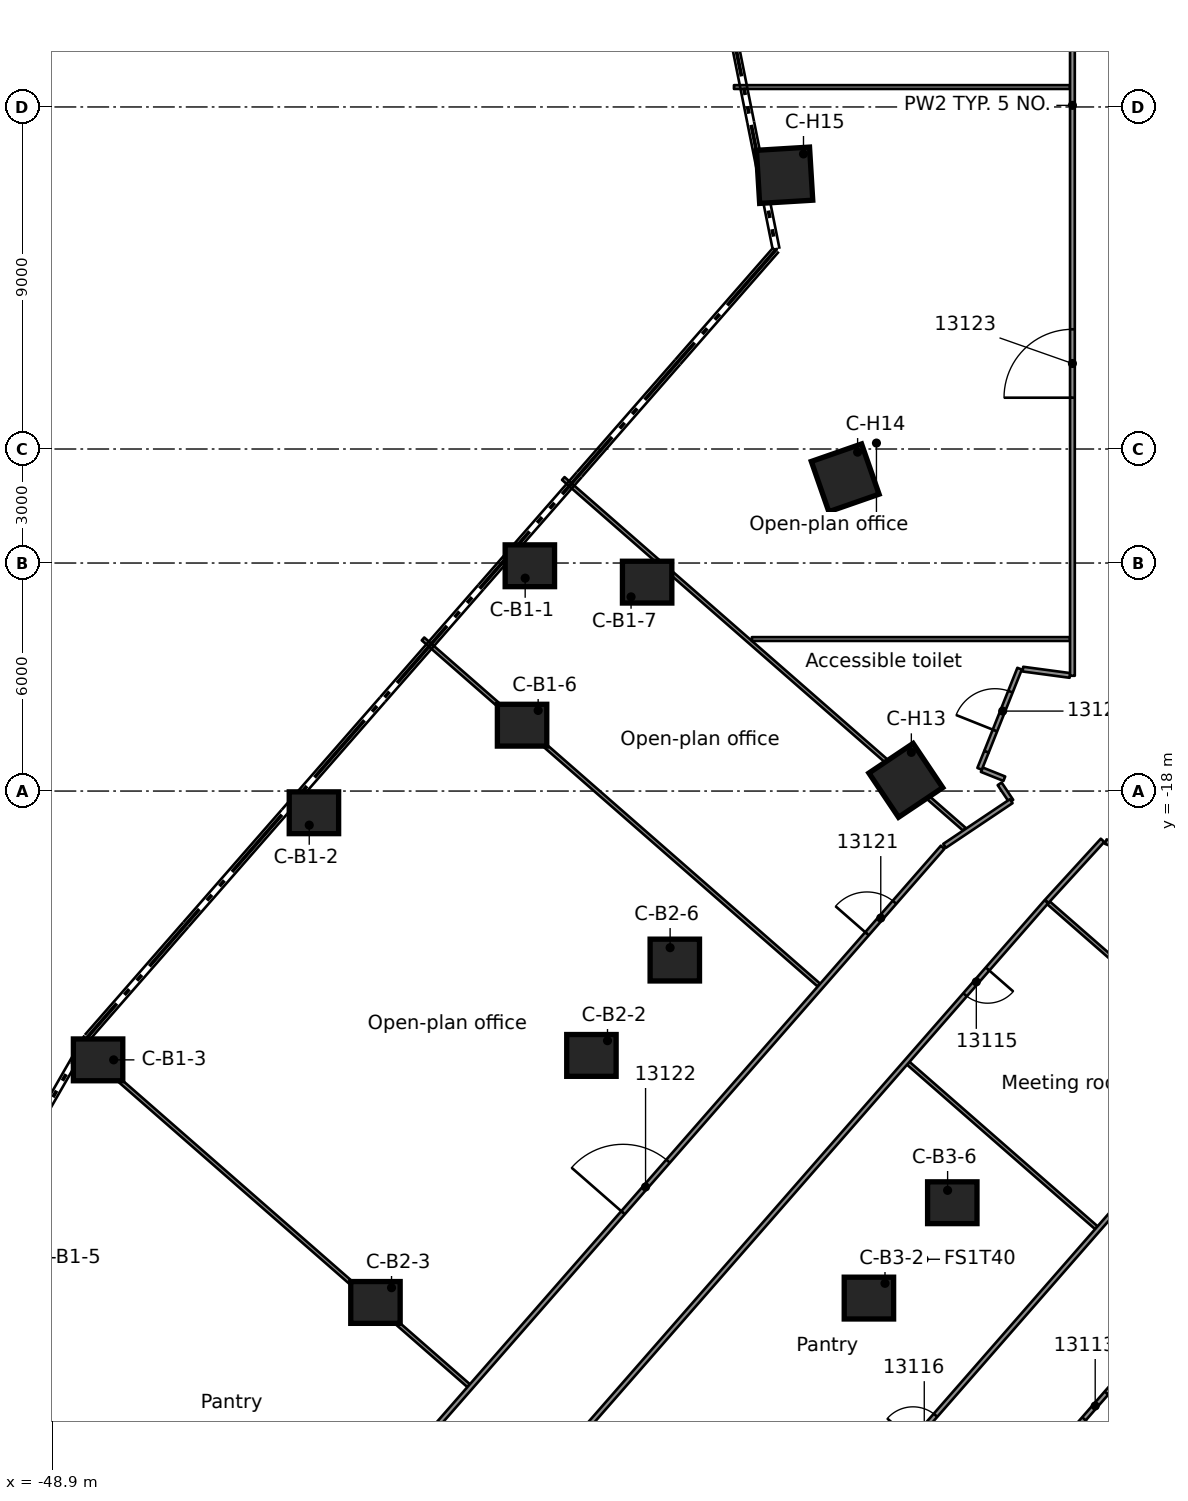
"""IFC4 building model, lengths in metres.
Left out: names, types, materials, properties, quantities, classifications, styles, units other than length and angle.
Written with IfcOpenShell. Run it as: python <this file> out.ifc"""

import sys

from ifc_helpers import new_model, si_unit, direction, frame, frame_2d, origin, origin_2d, place, context, subcontext, project, spatial, rectangle, extrude, element, fill, save


model = new_model("IFC4")
c1 = context("Model", 3, precision=1e-05, world=origin(), true_north=direction((0.0, 1.0)))
c2 = subcontext(c1, "Body", "Model", "MODEL_VIEW")
j1 = project(units=[si_unit("LENGTHUNIT", "METRE"), si_unit("PLANEANGLEUNIT", "RADIAN")], contexts=[c1])
p1 = place(None, origin())
s1 = spatial("IfcSite", under=j1, at=p1, CompositionType="ELEMENT")
p2 = place(p1, origin())
s2 = spatial("IfcBuilding", under=s1, at=p2, CompositionType="ELEMENT")
p3 = place(p2, frame((0.0, 0.0, 62.3)))
s3 = spatial("IfcBuildingStorey", under=s2, at=p3, CompositionType="ELEMENT", Elevation=62.3)
for number, where, z_axis, x_axis in (
    (1, (-36.327, -12.072, 0.0), (0.0, 0.0, 1.0), (1.0, 0.0, 0.0)),
    (2, (-42.009, -18.571, 0.0), (0.0, 0.0, 1.0), (1.0, 0.0, 0.0)),
    (3, (-47.689, -25.073, 0.0), (0.0, 0.0, 1.0), (1.0, 0.0, 0.0)),
    (4, (-36.532, -16.267, 0.0), (0.0, 0.0, 1.0), (1.0, 0.0, 0.0)),
    (5, (-33.241, -12.503, 0.0), (0.0, 0.0, 1.0), (1.0, 0.0, 0.0)),
    (6, (-34.707, -24.956, 0.0), (0.0, 0.0, 1.0), (1.0, 0.0, 0.0)),
    (7, (-40.39, -31.456, 0.0), (0.0, 0.0, 1.0), (1.0, 0.0, 0.0)),
    (8, (-32.513, -22.447, 0.0), (0.0, 0.0, 1.0), (1.0, 0.0, 0.0)),
    (9, (-27.405, -31.341, 0.0), (0.0, 0.0, 1.0), (1.0, 0.0, 0.0)),
    (10, (-25.211, -28.832, 0.0), (0.0, 0.0, 1.0), (1.0, 0.0, 0.0)),
):
    element("IfcColumn", number, at=place(p3, frame(where, z_axis=z_axis, x_axis=x_axis)), inside=s3, PredefinedType="COLUMN", context=c2, shape_type="SweptSolid", body=[
        extrude(rectangle(XDim=1.3, YDim=1.1, at=origin_2d()), origin(), (0.0, 0.0, 1.0), 3.5),
    ])
for number, where, z_axis, x_axis in (
    (11, (-26.434, -17.718, 0.0), (0.0, 0.0, 1.0), (-0.831, -0.557, 0.0)),
    (12, (-28.029, -9.758, 0.0), (0.0, 0.0, 1.0), (-0.944, -0.329, 0.0)),
    (13, (-29.624, -1.797, 0.0), (0.0, 0.0, 1.0), (-0.998, -0.061, 0.0)),
):
    element("IfcColumn", number, at=place(p3, frame(where, z_axis=z_axis, x_axis=x_axis)), inside=s3, PredefinedType="COLUMN", context=c2, shape_type="SweptSolid", body=[
        extrude(rectangle(XDim=1.4, YDim=1.4, at=origin_2d()), origin(), (0.0, 0.0, 1.0), 3.5),
    ])
p4 = place(p3, frame((-23.965, -17.81, 0.0), z_axis=(0.0, 0.0, 1.0), x_axis=(0.55613676815, -0.831090786323, 0.0)))
e14 = element("IfcWall", 14, at=p4, inside=s3, PredefinedType="PARTITIONING", context=c2, shape_type="SweptSolid", body=[
    extrude(rectangle(XDim=0.549, YDim=0.125, at=frame_2d((0.274, 0.0))), origin(), (0.0, 0.0, 1.0), 3.08),
])
p5 = place(p3, frame((-48.313, -24.572, 0.0), z_axis=(0.0, 0.0, 1.0), x_axis=(0.75276101301, -0.658293898872, 0.0)))
e15 = element("IfcWall", 15, at=p5, inside=s3, PredefinedType="PARTITIONING", context=c2, shape_type="SweptSolid", body=[
    extrude(rectangle(XDim=13.783, YDim=0.1, at=frame_2d((6.891, 0.0))), origin(), (0.0, 0.0, 1.0), 3.08),
])
p6 = place(p3, frame((-39.139, -13.997, 0.0), z_axis=(0.0, 0.0, 1.0), x_axis=(0.752825840036, -0.65821976161, 0.0)))
e16 = element("IfcWall", 16, at=p6, inside=s3, PredefinedType="PARTITIONING", context=c2, shape_type="SweptSolid", body=[
    extrude(rectangle(XDim=13.837, YDim=0.1, at=frame_2d((6.918, 0.0))), origin(), (0.0, 0.0, 1.0), 3.08),
])
p7 = place(p3, frame((-26.369, -25.163, 0.0), z_axis=(0.0, 0.0, 1.0), x_axis=(0.752836606275, -0.658207447734, 0.0)))
e17 = element("IfcWall", 17, at=p7, inside=s3, PredefinedType="PARTITIONING", context=c2, shape_type="SweptSolid", body=[
    extrude(rectangle(XDim=6.574, YDim=0.1, at=frame_2d((3.287, 0.0))), origin(), (0.0, 0.0, 1.0), 3.08),
])
p8 = place(p3, frame((-35.448, -9.776, 0.0), z_axis=(0.0, 0.0, 1.0), x_axis=(0.752812898316, -0.658234563153, 0.0)))
e18 = element("IfcWall", 18, at=p8, inside=s3, PredefinedType="PARTITIONING", context=c2, shape_type="SweptSolid", body=[
    extrude(rectangle(XDim=14.019, YDim=0.1, at=frame_2d((7.01, 0.0))), origin(), (0.0, 0.0, 1.0), 3.08),
])
p9 = place(p3, frame((-22.678, -20.942, 0.0), z_axis=(0.0, 0.0, 1.0), x_axis=(0.752838405923, -0.658205389349, 0.0)))
e19 = element("IfcWall", 19, at=p9, inside=s3, PredefinedType="PARTITIONING", context=c2, shape_type="SweptSolid", body=[
    extrude(rectangle(XDim=6.297, YDim=0.1, at=frame_2d((3.149, 0.0))), origin(), (0.0, 0.0, 1.0), 3.08),
])
p10 = place(p3, frame((-24.435, -17.438, 0.0), z_axis=(0.0, 0.0, 1.0), x_axis=(0.928555762044, -0.3711929374, 0.0)))
e20 = element("IfcWall", 20, at=p10, inside=s3, PredefinedType="PARTITIONING", context=c2, shape_type="SweptSolid", body=[
    extrude(rectangle(XDim=0.639, YDim=0.125, at=frame_2d((0.319, 0.0))), origin(), (0.0, 0.0, 1.0), 3.08),
])
p11 = place(p3, frame((-21.173, -19.329, 0.0), z_axis=(0.0, 0.0, 1.0), x_axis=(0.928691976307, -0.37085200976, 0.0)))
e21 = element("IfcWall", 21, at=p11, inside=s3, PredefinedType="PARTITIONING", context=c2, shape_type="SweptSolid", body=[
    extrude(rectangle(XDim=0.547, YDim=0.125, at=frame_2d((0.273, 0.0))), origin(), (0.0, 0.0, 1.0), 3.08),
])
p12 = place(p3, frame((-23.353, -14.792, 0.0), z_axis=(0.0, 0.0, 1.0), x_axis=(0.991114791297, -0.133009287168, 0.0)))
e22 = element("IfcWall", 22, at=p12, inside=s3, PredefinedType="PARTITIONING", context=c2, shape_type="SweptSolid", body=[
    extrude(rectangle(XDim=1.248, YDim=0.125, at=frame_2d((0.624, 0.0))), origin(), (0.0, 0.0, 1.0), 3.08),
])
p13 = place(p3, frame((-30.485, -14.0, 0.0), z_axis=(0.0, 0.0, 1.0), x_axis=(1.0, 0.0, 0.0)))
e23 = element("IfcWall", 23, at=p13, inside=s3, PredefinedType="PARTITIONING", context=c2, shape_type="SweptSolid", body=[
    extrude(rectangle(XDim=8.372, YDim=0.1, at=frame_2d((4.186, 0.0))), origin(), (0.0, 0.0, 1.0), 3.08),
])
p14 = place(p3, frame((-30.956, 0.524, 0.0), z_axis=(0.0, 0.0, 1.0), x_axis=(1.0, 0.0, 0.0)))
e24 = element("IfcWall", 24, at=p14, inside=s3, PredefinedType="PARTITIONING", context=c2, shape_type="SweptSolid", body=[
    extrude(rectangle(XDim=8.843, YDim=0.1, at=frame_2d((4.421, 0.0))), origin(), (0.0, 0.0, 1.0), 3.08),
])
p15 = place(p3, frame((-23.66, -18.266, 0.0), z_axis=(0.0, 0.0, 1.0), x_axis=(-0.83066036782, -0.556779447658, 0.0)))
e25 = element("IfcWall", 25, at=p15, inside=s3, PredefinedType="PARTITIONING", context=c2, shape_type="SweptSolid", body=[
    extrude(rectangle(XDim=2.112, YDim=0.125, at=frame_2d((1.056, 0.0))), origin(), (0.0, 0.0, 1.0), 3.08),
])
p16 = place(p3, frame((-22.725, -20.901, 0.0), z_axis=(0.0, 0.0, 1.0), x_axis=(0.674921155875, 0.737889851775, 0.0)))
e26 = element("IfcWall", 26, at=p16, inside=s3, PredefinedType="PARTITIONING", context=c2, shape_type="SweptSolid", body=[
    extrude(rectangle(XDim=2.175, YDim=0.125, at=frame_2d((1.087, 0.0))), origin(), (0.0, 0.0, 1.0), 3.08),
])
p17 = place(p3, frame((-15.464, -27.332, 0.0), z_axis=(0.0, 0.0, 1.0), x_axis=(-0.658219577617, -0.752826000907, 0.0)))
e27 = element("IfcWall", 27, at=p17, inside=s3, PredefinedType="PARTITIONING", context=c2, shape_type="SweptSolid", body=[
    extrude(rectangle(XDim=24.745, YDim=0.125, at=frame_2d((12.373, 0.0))), origin(), (0.0, 0.0, 1.0), 3.08),
])
p18 = place(p17, frame((2.288, 0.0, 0.0)))
e28 = element("IfcOpeningElement", 28, at=p18, cuts=e27, PredefinedType="OPENING", context=c2, shape_type="SweptSolid", body=[
    extrude(rectangle(XDim=0.9, YDim=2.1, at=frame_2d((0.45, 1.05))), frame((0.0, 0.073, 0.0), z_axis=(0.0, -1.0, 0.0), x_axis=(1.0, 0.0, 0.0)), (0.0, 0.0, 1.0), 0.145),
])
p19 = place(p17, frame((8.645, 0.0, 0.0)))
e29 = element("IfcOpeningElement", 29, at=p19, cuts=e27, PredefinedType="OPENING", context=c2, shape_type="SweptSolid", body=[
    extrude(rectangle(XDim=0.9, YDim=2.1, at=frame_2d((0.45, 1.05))), frame((0.0, 0.073, 0.0), z_axis=(0.0, -1.0, 0.0), x_axis=(1.0, 0.0, 0.0)), (0.0, 0.0, 1.0), 0.145),
])
p20 = place(p17, frame((15.646, 0.0, 0.0)))
e30 = element("IfcOpeningElement", 30, at=p20, cuts=e27, PredefinedType="OPENING", context=c2, shape_type="SweptSolid", body=[
    extrude(rectangle(XDim=0.9, YDim=2.1, at=frame_2d((0.45, 1.05))), frame((0.0, 0.073, 0.0), z_axis=(0.0, -1.0, 0.0), x_axis=(1.0, 0.0, 0.0)), (0.0, 0.0, 1.0), 0.145),
])
p21 = place(p17, frame((21.645, 0.0, 0.0)))
e31 = element("IfcOpeningElement", 31, at=p21, cuts=e27, PredefinedType="OPENING", context=c2, shape_type="SweptSolid", body=[
    extrude(rectangle(XDim=0.9, YDim=2.1, at=frame_2d((0.45, 1.05))), frame((0.0, 0.073, 0.0), z_axis=(0.0, -1.0, 0.0), x_axis=(1.0, 0.0, 0.0)), (0.0, 0.0, 1.0), 0.145),
])
p22 = place(p3, frame((-32.036, -41.726, 0.0), z_axis=(0.0, 0.0, 1.0), x_axis=(0.658205705433, 0.75283812957, 0.0)))
e32 = element("IfcWall", 32, at=p22, inside=s3, PredefinedType="PARTITIONING", context=c2, shape_type="SweptSolid", body=[
    extrude(rectangle(XDim=21.168, YDim=0.125, at=frame_2d((10.584, 0.0))), origin(), (0.0, 0.0, 1.0), 3.08),
])
p23 = place(p22, frame((8.798, 0.0, 0.0)))
e33 = element("IfcOpeningElement", 33, at=p23, cuts=e32, PredefinedType="OPENING", context=c2, shape_type="SweptSolid", body=[
    extrude(rectangle(XDim=0.9, YDim=2.1, at=frame_2d((0.45, 1.05))), frame((0.0, 0.073, 0.0), z_axis=(0.0, -1.0, 0.0), x_axis=(1.0, 0.0, 0.0)), (0.0, 0.0, 1.0), 0.145),
])
p24 = place(p3, frame((-22.736, -20.913, 0.0), z_axis=(0.0, 0.0, 1.0), x_axis=(-0.658236458127, -0.752811241409, 0.0)))
e34 = element("IfcWall", 34, at=p24, inside=s3, PredefinedType="PARTITIONING", context=c2, shape_type="SweptSolid", body=[
    extrude(rectangle(XDim=21.79, YDim=0.125, at=frame_2d((10.895, 0.0))), origin(), (0.0, 0.0, 1.0), 3.08),
])
p25 = place(p24, frame((2.35, 0.0, 0.0)))
e35 = element("IfcOpeningElement", 35, at=p25, cuts=e34, PredefinedType="OPENING", context=c2, shape_type="SweptSolid", body=[
    extrude(rectangle(XDim=0.9, YDim=2.1, at=frame_2d((0.45, 1.05))), frame((0.0, 0.073, 0.0), z_axis=(0.0, -1.0, 0.0), x_axis=(1.0, 0.0, 0.0)), (0.0, 0.0, 1.0), 0.145),
])
p26 = place(p3, frame((-41.314, -37.6, 0.0), z_axis=(0.0, 0.0, 1.0), x_axis=(0.658340906106, 0.752719902319, 0.0)))
e36 = element("IfcWall", 36, at=p26, inside=s3, PredefinedType="PARTITIONING", context=c2, shape_type="SweptSolid", body=[
    extrude(rectangle(XDim=24.075, YDim=0.125, at=frame_2d((12.038, 0.0))), origin(), (0.0, 0.0, 1.0), 3.08),
])
p27 = place(p26, frame((21.051, 0.0, 0.0)))
e37 = element("IfcOpeningElement", 37, at=p27, cuts=e36, PredefinedType="OPENING", context=c2, shape_type="SweptSolid", body=[
    extrude(rectangle(XDim=1.1, YDim=2.1, at=frame_2d((0.55, 1.05))), frame((0.0, 0.073, 0.0), z_axis=(0.0, -1.0, 0.0), x_axis=(1.0, 0.0, 0.0)), (0.0, 0.0, 1.0), 0.145),
])
p28 = place(p26, frame((11.3, 0.0, 0.0)))
e38 = element("IfcOpeningElement", 38, at=p28, cuts=e36, PredefinedType="OPENING", context=c2, shape_type="SweptSolid", body=[
    extrude(rectangle(XDim=1.8, YDim=2.1, at=frame_2d((0.9, 1.05))), frame((0.0, 0.073, 0.0), z_axis=(0.0, -1.0, 0.0), x_axis=(1.0, 0.0, 0.0)), (0.0, 0.0, 1.0), 0.145),
])
p29 = place(p3, frame((-24.493, -17.415, 0.0), z_axis=(0.0, 0.0, 1.0), x_axis=(0.374072822582, 0.9273993333, 0.0)))
e39 = element("IfcWall", 39, at=p29, inside=s3, PredefinedType="PARTITIONING", context=c2, shape_type="SweptSolid", body=[
    extrude(rectangle(XDim=0.486, YDim=0.125, at=frame_2d((0.243, 0.0))), origin(), (0.0, 0.0, 1.0), 3.08),
])
p30 = place(p3, frame((-24.311, -16.964, 0.0), z_axis=(0.0, 0.0, 1.0), x_axis=(0.370459614681, 0.928848574252, 0.0)))
e40 = element("IfcWall", 40, at=p30, inside=s3, PredefinedType="PARTITIONING", context=c2, shape_type="SweptSolid", body=[
    extrude(rectangle(XDim=2.351, YDim=0.125, at=frame_2d((1.176, 0.0))), origin(), (0.0, 0.0, 1.0), 3.08),
])
p31 = place(p30, frame((0.6, 0.0, 0.0)))
e41 = element("IfcOpeningElement", 41, at=p31, cuts=e40, PredefinedType="OPENING", context=c2, shape_type="SweptSolid", body=[
    extrude(rectangle(XDim=1.1, YDim=2.1, at=frame_2d((0.55, 1.05))), frame((0.0, 0.073, 0.0), z_axis=(0.0, -1.0, 0.0), x_axis=(1.0, 0.0, 0.0)), (0.0, 0.0, 1.0), 0.145),
])
p32 = place(p3, frame((-22.05, -14.967, 0.0), z_axis=(0.0, 0.0, 1.0), x_axis=(0.0, 1.0, 0.0)))
e42 = element("IfcWall", 42, at=p32, inside=s3, PredefinedType="PARTITIONING", context=c2, shape_type="SweptSolid", body=[
    extrude(rectangle(XDim=30.018, YDim=0.125, at=frame_2d((15.009, 0.0))), origin(), (0.0, 0.0, 1.0), 3.08),
])
p33 = place(p32, frame((7.317, 0.0, 0.0)))
e43 = element("IfcOpeningElement", 43, at=p33, cuts=e42, PredefinedType="OPENING", context=c2, shape_type="SweptSolid", body=[
    extrude(rectangle(XDim=1.8, YDim=2.1, at=frame_2d((0.9, 1.05))), frame((0.0, 0.073, 0.0), z_axis=(0.0, -1.0, 0.0), x_axis=(1.0, 0.0, 0.0)), (0.0, 0.0, 1.0), 0.145),
])
p34 = place(p32, frame((18.591, 0.0, 0.0)))
e44 = element("IfcOpeningElement", 44, at=p34, cuts=e42, PredefinedType="OPENING", context=c2, shape_type="SweptSolid", body=[
    extrude(rectangle(XDim=1.1, YDim=2.1, at=frame_2d((0.55, 1.05))), frame((0.0, 0.073, 0.0), z_axis=(0.0, -1.0, 0.0), x_axis=(1.0, 0.0, 0.0)), (0.0, 0.0, 1.0), 0.145),
])
p35 = place(p19, origin())
e45 = element("IfcDoor", 45, at=p35, inside=s3, OperationType="SINGLE_SWING_LEFT", PredefinedType="DOOR", context=c2, shape_type="SweptSolid", body=[
    extrude(rectangle(XDim=0.9, YDim=2.1, at=frame_2d((0.45, 1.05))), frame((0.0, 0.025, 0.0), z_axis=(0.0, -1.0, 0.0), x_axis=(1.0, 0.0, 0.0)), (0.0, 0.0, 1.0), 0.05),
])
fill(e29, e45)
p36 = place(p25, origin())
e46 = element("IfcDoor", 46, at=p36, inside=s3, OperationType="SINGLE_SWING_LEFT", PredefinedType="DOOR", context=c2, shape_type="SweptSolid", body=[
    extrude(rectangle(XDim=0.9, YDim=2.1, at=frame_2d((0.45, 1.05))), frame((0.0, 0.025, 0.0), z_axis=(0.0, -1.0, 0.0), x_axis=(1.0, 0.0, 0.0)), (0.0, 0.0, 1.0), 0.05),
])
fill(e35, e46)
p37 = place(p23, origin())
e47 = element("IfcDoor", 47, at=p37, inside=s3, OperationType="SINGLE_SWING_LEFT", PredefinedType="DOOR", context=c2, shape_type="SweptSolid", body=[
    extrude(rectangle(XDim=0.9, YDim=2.1, at=frame_2d((0.45, 1.05))), frame((0.0, 0.025, 0.0), z_axis=(0.0, -1.0, 0.0), x_axis=(1.0, 0.0, 0.0)), (0.0, 0.0, 1.0), 0.05),
])
fill(e33, e47)
p38 = place(p27, origin())
e48 = element("IfcDoor", 48, at=p38, inside=s3, OperationType="SINGLE_SWING_RIGHT", PredefinedType="DOOR", context=c2, shape_type="SweptSolid", body=[
    extrude(rectangle(XDim=1.1, YDim=2.1, at=frame_2d((0.55, 1.05))), frame((0.0, 0.025, 0.0), z_axis=(0.0, -1.0, 0.0), x_axis=(1.0, 0.0, 0.0)), (0.0, 0.0, 1.0), 0.05),
])
fill(e37, e48)
p39 = place(p28, origin())
e49 = element("IfcDoor", 49, at=p39, inside=s3, OperationType="DOUBLE_DOOR_SINGLE_SWING", PredefinedType="DOOR", context=c2, shape_type="SweptSolid", body=[
    extrude(rectangle(XDim=1.8, YDim=2.1, at=frame_2d((0.9, 1.05))), frame((0.0, 0.025, 0.0), z_axis=(0.0, -1.0, 0.0), x_axis=(1.0, 0.0, 0.0)), (0.0, 0.0, 1.0), 0.05),
])
fill(e38, e49)
p40 = place(p33, origin())
e50 = element("IfcDoor", 50, at=p40, inside=s3, OperationType="DOUBLE_DOOR_SINGLE_SWING", PredefinedType="DOOR", context=c2, shape_type="SweptSolid", body=[
    extrude(rectangle(XDim=1.8, YDim=2.1, at=frame_2d((0.9, 1.05))), frame((0.0, 0.025, 0.0), z_axis=(0.0, -1.0, 0.0), x_axis=(1.0, 0.0, 0.0)), (0.0, 0.0, 1.0), 0.05),
])
fill(e43, e50)
p41 = place(p31, origin())
e51 = element("IfcDoor", 51, at=p41, inside=s3, OperationType="SINGLE_SWING_LEFT", PredefinedType="DOOR", context=c2, shape_type="SweptSolid", body=[
    extrude(rectangle(XDim=1.1, YDim=2.1, at=frame_2d((0.55, 1.05))), frame((0.0, 0.025, 0.0), z_axis=(0.0, -1.0, 0.0), x_axis=(1.0, 0.0, 0.0)), (0.0, 0.0, 1.0), 0.05),
])
fill(e41, e51)
save(model, sys.argv[1])
